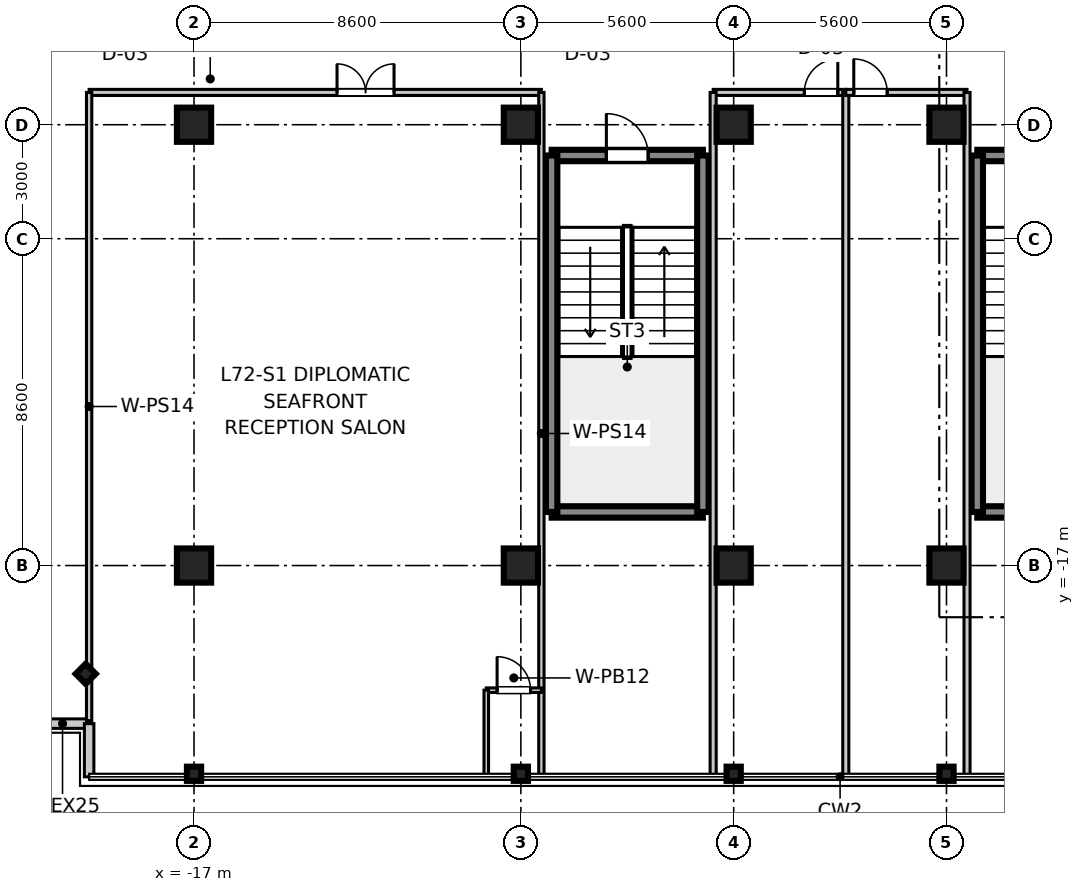
"""IFC4 building model, lengths in metres.
Left out: names, types, materials, properties, quantities, classifications, styles, units other than length and angle.
Written with IfcOpenShell. Run it as: python <this file> out.ifc"""

import sys

from ifc_helpers import new_model, si_unit, direction, frame, frame_2d, origin, origin_2d, place, context, subcontext, project, spatial, rectangle, i_section, extrude, source, transform, mapped, element, fill, save


model = new_model("IFC4")
c1 = context("Model", 3, precision=1e-05, world=origin(), true_north=direction((0.0, 1.0)))
c2 = subcontext(c1, "Body", "Model", "MODEL_VIEW")
j1 = project(units=[si_unit("LENGTHUNIT", "METRE"), si_unit("PLANEANGLEUNIT", "RADIAN")], contexts=[c1])
p1 = place(None, origin())
s1 = spatial("IfcSite", under=j1, at=p1, CompositionType="ELEMENT")
p2 = place(p1, origin())
s2 = spatial("IfcBuilding", under=s1, at=p2, CompositionType="ELEMENT")
p3 = place(p2, frame((0.0, 0.0, 281.3)))
s3 = spatial("IfcBuildingStorey", under=s2, at=p3, CompositionType="ELEMENT", Elevation=281.3)
m1 = source(origin(), c2, "Body", "SweptSolid", [
    extrude(rectangle(XDim=0.9, YDim=0.9, at=origin_2d()), origin(), (0.0, 0.0, 1.0), 3.705),
])
for number, where, z_axis, x_axis in (
    (1, (-17.0, -17.0, 0.0), (0.0, 0.0, 1.0), (1.0, 0.0, 0.0)),
    (2, (-17.0, -5.4, 0.0), (0.0, 0.0, 1.0), (1.0, 0.0, 0.0)),
    (3, (-8.4, -17.0, 0.0), (0.0, 0.0, 1.0), (1.0, 0.0, 0.0)),
    (4, (-8.4, -5.4, 0.0), (0.0, 0.0, 1.0), (1.0, 0.0, 0.0)),
    (5, (-2.8, -17.0, 0.0), (0.0, 0.0, 1.0), (1.0, 0.0, 0.0)),
    (6, (-2.8, -5.4, 0.0), (0.0, 0.0, 1.0), (1.0, 0.0, 0.0)),
    (7, (2.8, -17.0, 0.0), (0.0, 0.0, 1.0), (1.0, 0.0, 0.0)),
    (8, (2.8, -5.4, 0.0), (0.0, 0.0, 1.0), (1.0, 0.0, 0.0)),
):
    element("IfcColumn", number, at=place(p3, frame(where, z_axis=z_axis, x_axis=x_axis)), inside=s3, PredefinedType="COLUMN", context=c2, shape_type="MappedRepresentation", body=[
        mapped(m1, transform((0.0, 0.0, 0.0), scale=1.0)),
    ])
m2 = source(origin(), c2, "Body", "SweptSolid", [
    extrude(i_section(OverallWidth=0.374, OverallDepth=0.374, WebThickness=0.014, FlangeThickness=0.023, at=origin_2d()), origin(), (0.0, 0.0, 1.0), 3.705),
])
for number, where, z_axis, x_axis in (
    (9, (-17.0, -22.48, 0.0), (0.0, 0.0, 1.0), (0.0, 1.0, 0.0)),
    (10, (-8.4, -22.48, 0.0), (0.0, 0.0, 1.0), (0.0, 1.0, 0.0)),
    (11, (-2.8, -22.48, 0.0), (0.0, 0.0, 1.0), (0.0, 1.0, 0.0)),
    (12, (2.8, -22.48, 0.0), (0.0, 0.0, 1.0), (0.0, 1.0, 0.0)),
    (13, (-19.85, -19.85, 0.0), (0.0, 0.0, 1.0), (0.707, 0.707, 0.0)),
):
    element("IfcColumn", number, at=place(p3, frame(where, z_axis=z_axis, x_axis=x_axis)), inside=s3, PredefinedType="COLUMN", context=c2, shape_type="MappedRepresentation", body=[
        mapped(m2, transform((0.0, 0.0, 0.0), scale=1.0)),
    ])
m3 = source(origin(), c2, "Body", "SweptSolid", [
    extrude(rectangle(XDim=3.98, YDim=0.3, at=frame_2d((1.99, 0.0))), origin(), (0.0, 0.0, 1.0), 3.45),
])
for number, where, z_axis, x_axis in (
    (14, (3.61, -15.59, 0.0), (0.0, 0.0, 1.0), (1.0, 0.0, 0.0)),
    (15, (3.61, -6.21, 0.0), (0.0, 0.0, 1.0), (1.0, 0.0, 0.0)),
):
    element("IfcWall", number, at=place(p3, frame(where, z_axis=z_axis, x_axis=x_axis)), inside=s3, PredefinedType="SHEAR", context=c2, shape_type="MappedRepresentation", body=[
        mapped(m3, transform((0.0, 0.0, 0.0), scale=1.0)),
    ])
m4 = source(origin(), c2, "Body", "SweptSolid", [
    extrude(rectangle(XDim=9.38, YDim=0.3, at=frame_2d((4.69, 0.0))), origin(), (0.0, 0.0, 1.0), 3.45),
])
p4 = place(p3, frame((3.61, -15.59, 0.0), z_axis=(0.0, 0.0, 1.0), x_axis=(0.0, 1.0, 0.0)))
e16 = element("IfcWall", 16, at=p4, inside=s3, PredefinedType="SHEAR", context=c2, shape_type="MappedRepresentation", body=[
    mapped(m4, transform((0.0, 0.0, 0.0), scale=1.0)),
])
p5 = place(p3, frame((-7.59, -15.59, 0.0), z_axis=(0.0, 0.0, 1.0), x_axis=(1.0, 0.0, 0.0)))
e17 = element("IfcWall", 17, at=p5, inside=s3, PredefinedType="SHEAR", context=c2, shape_type="MappedRepresentation", body=[
    mapped(m3, transform((0.0, 0.0, 0.0), scale=1.0)),
])
p6 = place(p3, frame((-7.59, -6.21, 0.0), z_axis=(0.0, 0.0, 1.0), x_axis=(1.0, 0.0, 0.0)))
e18 = element("IfcWall", 18, at=p6, inside=s3, PredefinedType="SHEAR", context=c2, shape_type="MappedRepresentation", body=[
    mapped(m3, transform((0.0, 0.0, 0.0), scale=1.0)),
])
p7 = place(p6, frame((1.44, 0.0, 0.0)))
e19 = element("IfcOpeningElement", 19, at=p7, cuts=e18, PredefinedType="OPENING", context=c2, shape_type="SweptSolid", body=[
    extrude(rectangle(XDim=1.1, YDim=2.15, at=frame_2d((0.55, 1.075))), frame((0.0, 0.16, 0.0), z_axis=(0.0, -1.0, 0.0), x_axis=(1.0, 0.0, 0.0)), (0.0, 0.0, 1.0), 0.32),
])
for number, where, z_axis, x_axis in (
    (20, (-7.59, -15.59, 0.0), (0.0, 0.0, 1.0), (0.0, 1.0, 0.0)),
    (21, (-3.61, -15.59, 0.0), (0.0, 0.0, 1.0), (0.0, 1.0, 0.0)),
):
    element("IfcWall", number, at=place(p3, frame(where, z_axis=z_axis, x_axis=x_axis)), inside=s3, PredefinedType="SHEAR", context=c2, shape_type="MappedRepresentation", body=[
        mapped(m4, transform((0.0, 0.0, 0.0), scale=1.0)),
    ])
m5 = source(origin(), c2, "Body", "SweptSolid", [
    extrude(rectangle(XDim=1.4, YDim=0.25, at=frame_2d((0.7, 0.0))), origin(), (0.0, 0.0, 1.0), 3.45),
])
p8 = place(p3, frame((-21.16, -21.16, 0.0), z_axis=(0.0, 0.0, 1.0), x_axis=(1.0, 0.0, 0.0)))
e22 = element("IfcWall", 22, at=p8, inside=s3, PredefinedType="STANDARD", context=c2, shape_type="MappedRepresentation", body=[
    mapped(m5, transform((0.0, 0.0, 0.0), scale=1.0)),
])
m6 = source(origin(), c2, "Body", "SweptSolid", [
    extrude(rectangle(XDim=1.4, YDim=0.25, at=frame_2d((0.7, 0.0))), origin(), (0.0, 0.0, 1.0), 3.45),
])
p9 = place(p3, frame((-19.76, -22.56, 0.0), z_axis=(0.0, 0.0, 1.0), x_axis=(0.0, 1.0, 0.0)))
e23 = element("IfcWall", 23, at=p9, inside=s3, PredefinedType="STANDARD", context=c2, shape_type="MappedRepresentation", body=[
    mapped(m6, transform((0.0, 0.0, 0.0), scale=1.0)),
])
m7 = source(origin(), c2, "Body", "SweptSolid", [
    extrude(rectangle(XDim=11.9, YDim=0.16, at=frame_2d((5.95, 0.0))), origin(), (0.0, 0.0, 1.0), 2.79),
])
p10 = place(p3, frame((-19.76, -4.55, 0.0), z_axis=(0.0, 0.0, 1.0), x_axis=(1.0, 0.0, 0.0)))
e24 = element("IfcWall", 24, at=p10, inside=s3, PredefinedType="PARTITIONING", context=c2, shape_type="MappedRepresentation", body=[
    mapped(m7, transform((0.0, 0.0, 0.0), scale=1.0)),
])
p11 = place(p10, frame((6.523, 0.0, 0.0)))
e25 = element("IfcOpeningElement", 25, at=p11, cuts=e24, PredefinedType="OPENING", context=c2, shape_type="SweptSolid", body=[
    extrude(rectangle(XDim=1.5, YDim=2.15, at=frame_2d((0.75, 1.075))), frame((0.0, 0.09, 0.0), z_axis=(0.0, -1.0, 0.0), x_axis=(1.0, 0.0, 0.0)), (0.0, 0.0, 1.0), 0.18),
])
m8 = source(origin(), c2, "Body", "SweptSolid", [
    extrude(rectangle(XDim=16.53, YDim=0.14, at=frame_2d((8.265, 0.0))), origin(), (0.0, 0.0, 1.0), 2.79),
])
p12 = place(p3, frame((-19.76, -21.08, 0.0), z_axis=(0.0, 0.0, 1.0), x_axis=(0.0, 1.0, 0.0)))
e26 = element("IfcWall", 26, at=p12, inside=s3, PredefinedType="PARTITIONING", context=c2, shape_type="MappedRepresentation", body=[
    mapped(m8, transform((0.0, 0.0, 0.0), scale=1.0)),
])
m9 = source(origin(), c2, "Body", "SweptSolid", [
    extrude(rectangle(XDim=17.95, YDim=0.14, at=frame_2d((8.975, 0.0))), origin(), (0.0, 0.0, 1.0), 2.79),
])
p13 = place(p3, frame((-7.86, -22.5, 0.0), z_axis=(0.0, 0.0, 1.0), x_axis=(0.0, 1.0, 0.0)))
e27 = element("IfcWall", 27, at=p13, inside=s3, PredefinedType="PARTITIONING", context=c2, shape_type="MappedRepresentation", body=[
    mapped(m9, transform((0.0, 0.0, 0.0), scale=1.0)),
])
m10 = source(origin(), c2, "Body", "SweptSolid", [
    extrude(rectangle(XDim=1.45, YDim=0.12, at=frame_2d((0.725, 0.0))), origin(), (0.0, 0.0, 1.0), 2.79),
])
p14 = place(p3, frame((-9.31, -20.28, 0.0), z_axis=(0.0, 0.0, 1.0), x_axis=(1.0, 0.0, 0.0)))
e28 = element("IfcWall", 28, at=p14, inside=s3, PredefinedType="PARTITIONING", context=c2, shape_type="MappedRepresentation", body=[
    mapped(m10, transform((0.0, 0.0, 0.0), scale=1.0)),
])
p15 = place(p14, frame((0.285, 0.0, 0.0)))
e29 = element("IfcOpeningElement", 29, at=p15, cuts=e28, PredefinedType="OPENING", context=c2, shape_type="SweptSolid", body=[
    extrude(rectangle(XDim=0.88, YDim=2.1, at=frame_2d((0.44, 1.05))), frame((0.0, 0.07, 0.0), z_axis=(0.0, -1.0, 0.0), x_axis=(1.0, 0.0, 0.0)), (0.0, 0.0, 1.0), 0.14),
])
m11 = source(origin(), c2, "Body", "SweptSolid", [
    extrude(rectangle(XDim=2.22, YDim=0.12, at=frame_2d((1.11, 0.0))), origin(), (0.0, 0.0, 1.0), 2.79),
])
p16 = place(p3, frame((-9.31, -22.5, 0.0), z_axis=(0.0, 0.0, 1.0), x_axis=(0.0, 1.0, 0.0)))
e30 = element("IfcWall", 30, at=p16, inside=s3, PredefinedType="PARTITIONING", context=c2, shape_type="MappedRepresentation", body=[
    mapped(m11, transform((0.0, 0.0, 0.0), scale=1.0)),
])
m12 = source(origin(), c2, "Body", "SweptSolid", [
    extrude(rectangle(XDim=3.49, YDim=0.16, at=frame_2d((1.745, 0.0))), origin(), (0.0, 0.0, 1.0), 2.79),
])
p17 = place(p3, frame((-3.34, -4.55, 0.0), z_axis=(0.0, 0.0, 1.0), x_axis=(1.0, 0.0, 0.0)))
e31 = element("IfcWall", 31, at=p17, inside=s3, PredefinedType="PARTITIONING", context=c2, shape_type="MappedRepresentation", body=[
    mapped(m12, transform((0.0, 0.0, 0.0), scale=1.0)),
])
p18 = place(p17, frame((2.4, 0.0, 0.0)))
e32 = element("IfcOpeningElement", 32, at=p18, cuts=e31, PredefinedType="OPENING", context=c2, shape_type="SweptSolid", body=[
    extrude(rectangle(XDim=0.88, YDim=2.1, at=frame_2d((0.44, 1.05))), frame((0.0, 0.09, 0.0), z_axis=(0.0, -1.0, 0.0), x_axis=(1.0, 0.0, 0.0)), (0.0, 0.0, 1.0), 0.18),
])
m13 = source(origin(), c2, "Body", "SweptSolid", [
    extrude(rectangle(XDim=17.95, YDim=0.16, at=frame_2d((8.975, 0.0))), origin(), (0.0, 0.0, 1.0), 2.79),
])
for number, where, z_axis, x_axis in (
    (33, (-3.34, -22.5, 0.0), (0.0, 0.0, 1.0), (0.0, 1.0, 0.0)),
    (34, (0.15, -22.5, 0.0), (0.0, 0.0, 1.0), (0.0, 1.0, 0.0)),
):
    element("IfcWall", number, at=place(p3, frame(where, z_axis=z_axis, x_axis=x_axis)), inside=s3, PredefinedType="PARTITIONING", context=c2, shape_type="MappedRepresentation", body=[
        mapped(m13, transform((0.0, 0.0, 0.0), scale=1.0)),
    ])
m14 = source(origin(), c2, "Body", "SweptSolid", [
    extrude(rectangle(XDim=3.19, YDim=0.16, at=frame_2d((1.595, 0.0))), origin(), (0.0, 0.0, 1.0), 2.79),
])
p19 = place(p3, frame((0.15, -4.55, 0.0), z_axis=(0.0, 0.0, 1.0), x_axis=(1.0, 0.0, 0.0)))
e35 = element("IfcWall", 35, at=p19, inside=s3, PredefinedType="PARTITIONING", context=c2, shape_type="MappedRepresentation", body=[
    mapped(m14, transform((0.0, 0.0, 0.0), scale=1.0)),
])
p20 = place(p19, frame((0.21, 0.0, 0.0)))
e36 = element("IfcOpeningElement", 36, at=p20, cuts=e35, PredefinedType="OPENING", context=c2, shape_type="SweptSolid", body=[
    extrude(rectangle(XDim=0.88, YDim=2.1, at=frame_2d((0.44, 1.05))), frame((0.0, 0.09, 0.0), z_axis=(0.0, -1.0, 0.0), x_axis=(1.0, 0.0, 0.0)), (0.0, 0.0, 1.0), 0.18),
])
p21 = place(p3, frame((3.34, -22.5, 0.0), z_axis=(0.0, 0.0, 1.0), x_axis=(0.0, 1.0, 0.0)))
e37 = element("IfcWall", 37, at=p21, inside=s3, PredefinedType="PARTITIONING", context=c2, shape_type="MappedRepresentation", body=[
    mapped(m13, transform((0.0, 0.0, 0.0), scale=1.0)),
])
m15 = source(origin(), c2, "Body", "SweptSolid", [
    extrude(rectangle(XDim=1.1, YDim=2.15, at=frame_2d((0.55, 1.075))), frame((0.0, 0.025, 0.0), z_axis=(0.0, -1.0, 0.0), x_axis=(1.0, 0.0, 0.0)), (0.0, 0.0, 1.0), 0.05),
])
p22 = place(p7, frame((1.1, 0.0, 0.0), z_axis=(0.0, 0.0, 1.0), x_axis=(-1.0, 0.0, 0.0)))
e38 = element("IfcDoor", 38, at=p22, inside=s3, OperationType="SINGLE_SWING_LEFT", PredefinedType="DOOR", context=c2, shape_type="MappedRepresentation", body=[
    mapped(m15, transform((0.0, 0.0, 0.0), scale=1.0)),
])
fill(e19, e38)
m16 = source(origin(), c2, "Body", "SweptSolid", [
    extrude(rectangle(XDim=0.88, YDim=2.1, at=frame_2d((0.44, 1.05))), frame((0.0, 0.025, 0.0), z_axis=(0.0, -1.0, 0.0), x_axis=(1.0, 0.0, 0.0)), (0.0, 0.0, 1.0), 0.05),
])
p23 = place(p15, frame((0.88, 0.0, 0.0), z_axis=(0.0, 0.0, 1.0), x_axis=(-1.0, 0.0, 0.0)))
e39 = element("IfcDoor", 39, at=p23, inside=s3, OperationType="SINGLE_SWING_LEFT", PredefinedType="DOOR", context=c2, shape_type="MappedRepresentation", body=[
    mapped(m16, transform((0.0, 0.0, 0.0), scale=1.0)),
])
fill(e29, e39)
m17 = source(origin(), c2, "Body", "SweptSolid", [
    extrude(rectangle(XDim=1.5, YDim=2.15, at=frame_2d((0.75, 1.075))), frame((0.0, 0.025, 0.0), z_axis=(0.0, -1.0, 0.0), x_axis=(1.0, 0.0, 0.0)), (0.0, 0.0, 1.0), 0.05),
])
p24 = place(p11, frame((1.5, 0.0, 0.0), z_axis=(0.0, 0.0, 1.0), x_axis=(-1.0, 0.0, 0.0)))
e40 = element("IfcDoor", 40, at=p24, inside=s3, OperationType="DOUBLE_DOOR_SINGLE_SWING", PredefinedType="DOOR", context=c2, shape_type="MappedRepresentation", body=[
    mapped(m17, transform((0.0, 0.0, 0.0), scale=1.0)),
])
fill(e25, e40)
p25 = place(p18, frame((0.88, 0.0, 0.0), z_axis=(0.0, 0.0, 1.0), x_axis=(-1.0, 0.0, 0.0)))
e41 = element("IfcDoor", 41, at=p25, inside=s3, OperationType="SINGLE_SWING_RIGHT", PredefinedType="DOOR", context=c2, shape_type="MappedRepresentation", body=[
    mapped(m16, transform((0.0, 0.0, 0.0), scale=1.0)),
])
fill(e32, e41)
p26 = place(p20, frame((0.88, 0.0, 0.0), z_axis=(0.0, 0.0, 1.0), x_axis=(-1.0, 0.0, 0.0)))
e42 = element("IfcDoor", 42, at=p26, inside=s3, OperationType="SINGLE_SWING_LEFT", PredefinedType="DOOR", context=c2, shape_type="MappedRepresentation", body=[
    mapped(m16, transform((0.0, 0.0, 0.0), scale=1.0)),
])
fill(e36, e42)
save(model, sys.argv[1])
